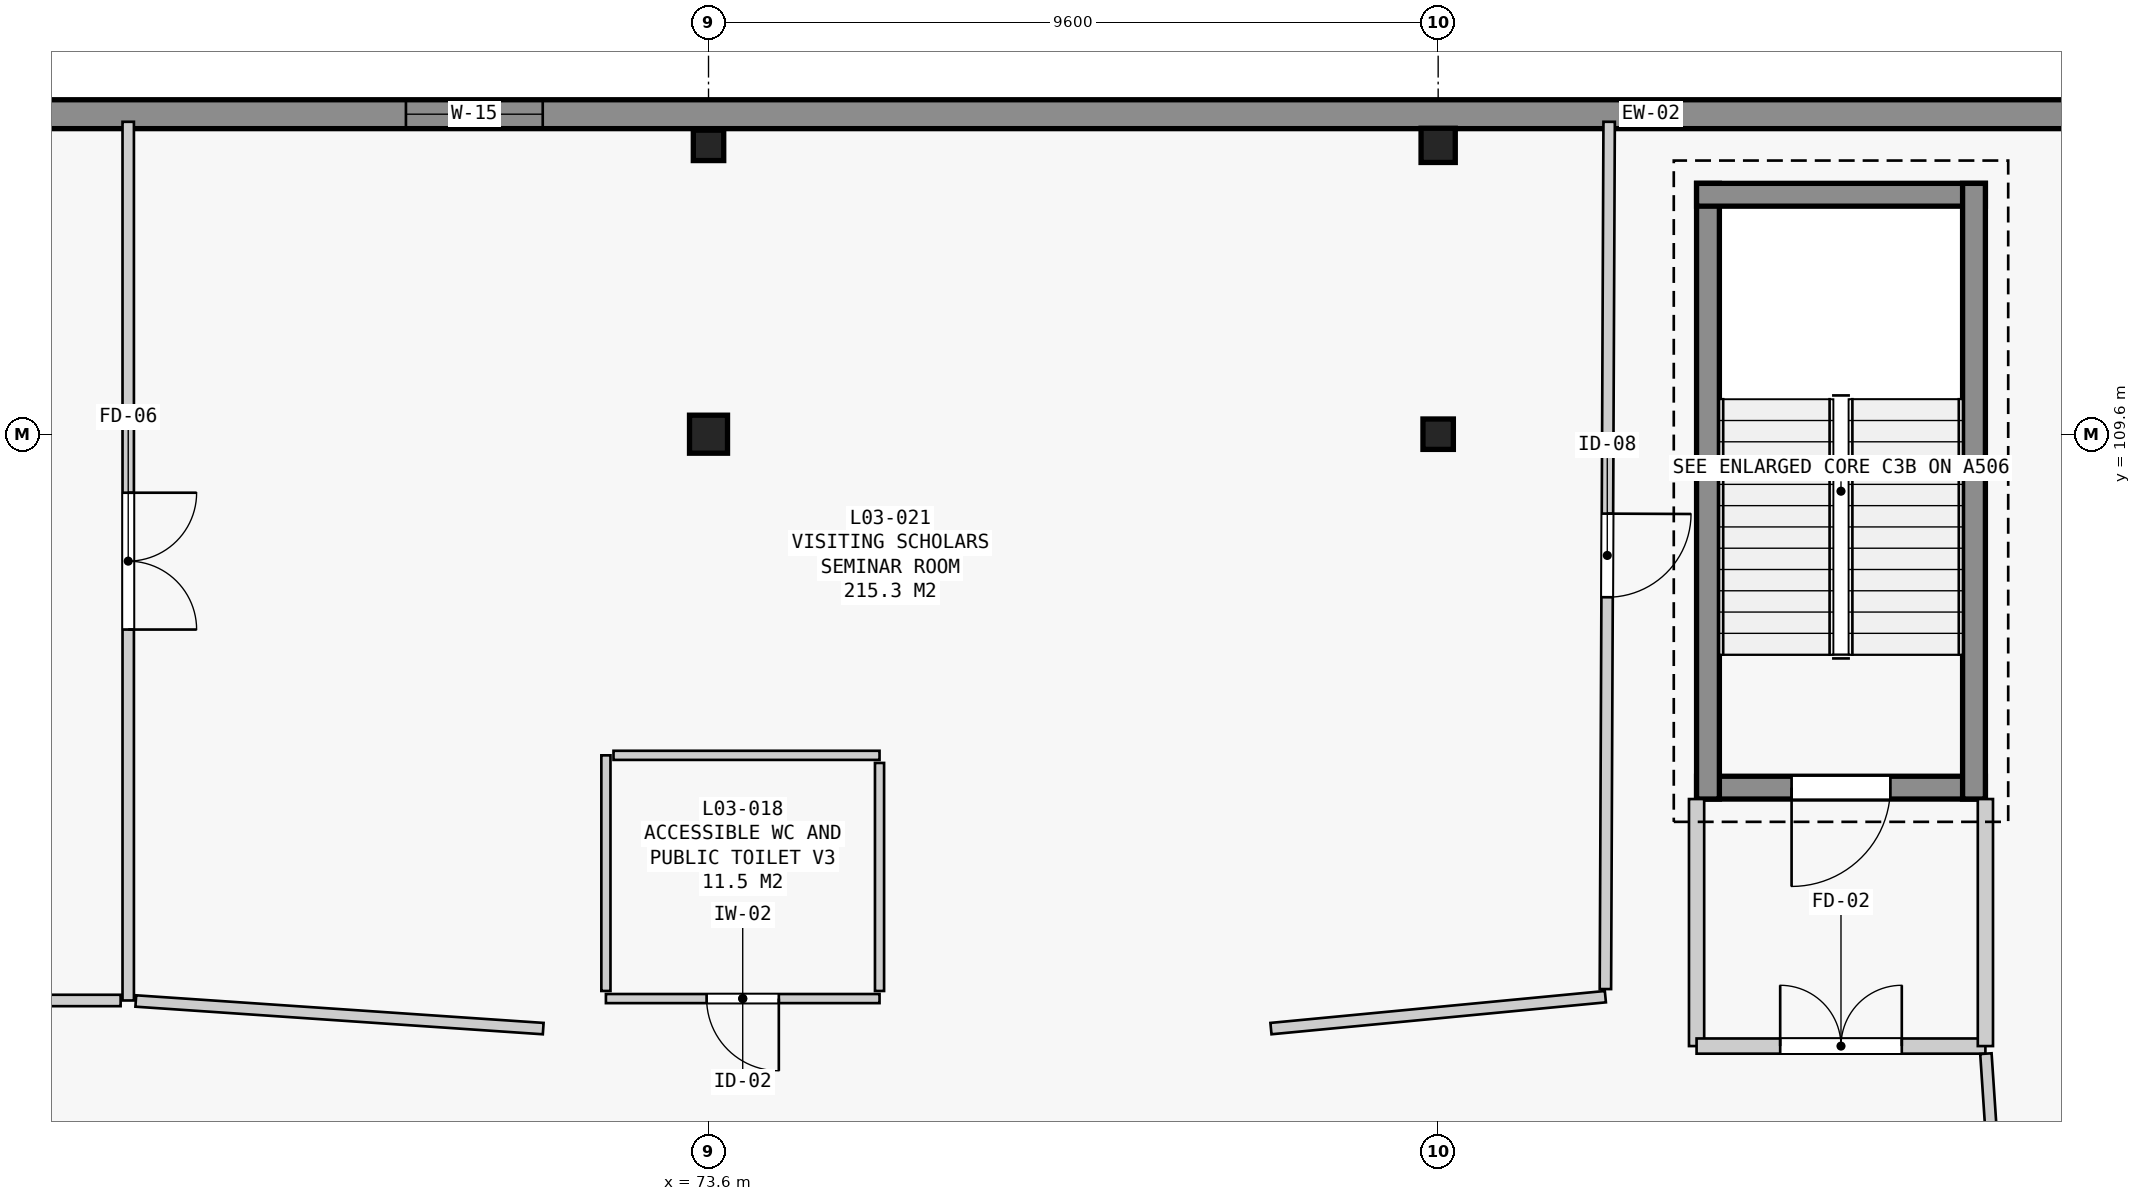
"""IFC4 building model, lengths in metres.
Left out: names, types, materials, properties, quantities, classifications, styles, units other than length and angle.
Written with IfcOpenShell. Run it as: python <this file> out.ifc"""

import sys

from ifc_helpers import new_model, si_unit, direction, frame, frame_2d, origin, origin_2d, place, context, subcontext, project, spatial, rectangle, extrude, element, fill, save


model = new_model("IFC4")
c1 = context("Model", 3, precision=1e-05, world=origin(), true_north=direction((0.0, 1.0)))
c2 = subcontext(c1, "Body", "Model", "MODEL_VIEW")
j1 = project(units=[si_unit("LENGTHUNIT", "METRE"), si_unit("PLANEANGLEUNIT", "RADIAN")], contexts=[c1])
p1 = place(None, origin())
s1 = spatial("IfcSite", under=j1, at=p1, CompositionType="ELEMENT")
p2 = place(p1, origin())
s2 = spatial("IfcBuilding", under=s1, at=p2, CompositionType="ELEMENT")
p3 = place(p2, frame((0.0, 0.0, 13.8)))
s3 = spatial("IfcBuildingStorey", under=s2, at=p3, CompositionType="ELEMENT", Elevation=13.8)
p4 = place(p3, frame((73.6, 109.6, 0.0), z_axis=(0.0, 0.0, 1.0), x_axis=(1.0, 0.0, 0.0)))
e1 = element("IfcColumn", 1, at=p4, inside=s3, PredefinedType="COLUMN", context=c2, shape_type="SweptSolid", body=[
    extrude(rectangle(XDim=0.5, YDim=0.5, at=origin_2d()), origin(), (0.0, 0.0, 1.0), 4.5),
])
for number, where, z_axis, x_axis in (
    (2, (73.6, 113.4, 0.0), (0.0, 0.0, 1.0), (1.0, 0.0, 0.0)),
    (3, (83.2, 109.6, 0.0), (0.0, 0.0, 1.0), (1.0, 0.0, 0.0)),
):
    element("IfcColumn", number, at=place(p3, frame(where, z_axis=z_axis, x_axis=x_axis)), inside=s3, PredefinedType="COLUMN", context=c2, shape_type="SweptSolid", body=[
        extrude(rectangle(XDim=0.4, YDim=0.4, at=origin_2d()), origin(), (0.0, 0.0, 1.0), 4.5),
    ])
p5 = place(p3, frame((83.2, 113.4, 0.0), z_axis=(0.0, 0.0, 1.0), x_axis=(1.0, 0.0, 0.0)))
e4 = element("IfcColumn", 4, at=p5, inside=s3, PredefinedType="COLUMN", context=c2, shape_type="SweptSolid", body=[
    extrude(rectangle(XDim=0.45, YDim=0.45, at=origin_2d()), origin(), (0.0, 0.0, 1.0), 4.5),
])
p6 = place(p3, frame((46.29, 113.81, 0.0), z_axis=(0.0, 0.0, 1.0), x_axis=(1.0, 0.0, 0.0)))
e5 = element("IfcWall", 5, at=p6, inside=s3, PredefinedType="STANDARD", context=c2, shape_type="SweptSolid", body=[
    extrude(rectangle(XDim=78.32, YDim=0.38, at=frame_2d((39.16, 0.0))), origin(), (0.0, 0.0, 1.0), 4.22),
])
p7 = place(p6, frame((23.329, 0.0, 1.05)))
e6 = element("IfcOpeningElement", 6, at=p7, cuts=e5, PredefinedType="OPENING", context=c2, shape_type="SweptSolid", body=[
    extrude(rectangle(XDim=1.8, YDim=2.5, at=frame_2d((0.9, 1.25))), frame((0.0, 0.2, 0.0), z_axis=(0.0, -1.0, 0.0), x_axis=(1.0, 0.0, 0.0)), (0.0, 0.0, 1.0), 0.4),
])
p8 = place(p6, frame((50.491, 0.0, 1.65)))
e7 = element("IfcOpeningElement", 7, at=p8, cuts=e5, PredefinedType="OPENING", context=c2, shape_type="SweptSolid", body=[
    extrude(rectangle(XDim=2.4, YDim=1.8, at=frame_2d((1.2, 0.9))), frame((0.0, 0.2, 0.0), z_axis=(0.0, -1.0, 0.0), x_axis=(1.0, 0.0, 0.0)), (0.0, 0.0, 1.0), 0.4),
])
p9 = place(p3, frame((90.4, 104.95, 0.0), z_axis=(0.0, 0.0, 1.0), x_axis=(-1.0, 0.0, 0.0)))
e8 = element("IfcWall", 8, at=p9, inside=s3, PredefinedType="SHEAR", context=c2, shape_type="SweptSolid", body=[
    extrude(rectangle(XDim=3.8, YDim=0.3, at=frame_2d((1.9, 0.0))), origin(), (0.0, 0.0, 1.0), 4.22),
])
p10 = place(p9, frame((1.25, 0.0, 0.0)))
e9 = element("IfcOpeningElement", 9, at=p10, cuts=e8, PredefinedType="OPENING", context=c2, shape_type="SweptSolid", body=[
    extrude(rectangle(XDim=1.3, YDim=2.2, at=frame_2d((0.65, 1.1))), frame((0.0, 0.16, 0.0), z_axis=(0.0, -1.0, 0.0), x_axis=(1.0, 0.0, 0.0)), (0.0, 0.0, 1.0), 0.32),
])
p11 = place(p3, frame((86.75, 104.8, 0.0), z_axis=(0.0, 0.0, 1.0), x_axis=(0.0, 1.0, 0.0)))
e10 = element("IfcWall", 10, at=p11, inside=s3, PredefinedType="SHEAR", context=c2, shape_type="SweptSolid", body=[
    extrude(rectangle(XDim=8.1, YDim=0.3, at=frame_2d((4.05, 0.0))), origin(), (0.0, 0.0, 1.0), 4.22),
])
p12 = place(p3, frame((86.6, 112.75, 0.0), z_axis=(0.0, 0.0, 1.0), x_axis=(1.0, 0.0, 0.0)))
e11 = element("IfcWall", 11, at=p12, inside=s3, PredefinedType="SHEAR", context=c2, shape_type="SweptSolid", body=[
    extrude(rectangle(XDim=3.8, YDim=0.3, at=frame_2d((1.9, 0.0))), origin(), (0.0, 0.0, 1.0), 4.22),
])
p13 = place(p3, frame((90.25, 112.9, 0.0), z_axis=(0.0, 0.0, 1.0), x_axis=(0.0, -1.0, 0.0)))
e12 = element("IfcWall", 12, at=p13, inside=s3, PredefinedType="SHEAR", context=c2, shape_type="SweptSolid", body=[
    extrude(rectangle(XDim=8.1, YDim=0.3, at=frame_2d((4.05, 0.0))), origin(), (0.0, 0.0, 1.0), 4.22),
])
p14 = place(p3, frame((86.6, 104.8, 0.0), z_axis=(0.0, 0.0, 1.0), x_axis=(0.0, -1.0, 0.0)))
e13 = element("IfcWall", 13, at=p14, inside=s3, PredefinedType="STANDARD", context=c2, shape_type="SweptSolid", body=[
    extrude(rectangle(XDim=3.25, YDim=0.2, at=frame_2d((1.625, 0.0))), origin(), (0.0, 0.0, 1.0), 4.22),
])
p15 = place(p3, frame((86.6, 101.55, 0.0), z_axis=(0.0, 0.0, 1.0), x_axis=(1.0, 0.0, 0.0)))
e14 = element("IfcWall", 14, at=p15, inside=s3, PredefinedType="STANDARD", context=c2, shape_type="SweptSolid", body=[
    extrude(rectangle(XDim=3.8, YDim=0.2, at=frame_2d((1.9, 0.0))), origin(), (0.0, 0.0, 1.0), 4.22),
])
p16 = place(p15, frame((1.1, 0.0, 0.0)))
e15 = element("IfcOpeningElement", 15, at=p16, cuts=e14, PredefinedType="OPENING", context=c2, shape_type="SweptSolid", body=[
    extrude(rectangle(XDim=1.6, YDim=2.2, at=frame_2d((0.8, 1.1))), frame((0.0, 0.11, 0.0), z_axis=(0.0, -1.0, 0.0), x_axis=(1.0, 0.0, 0.0)), (0.0, 0.0, 1.0), 0.22),
])
p17 = place(p3, frame((90.4, 101.55, 0.0), z_axis=(0.0, 0.0, 1.0), x_axis=(0.0, 1.0, 0.0)))
e16 = element("IfcWall", 16, at=p17, inside=s3, PredefinedType="STANDARD", context=c2, shape_type="SweptSolid", body=[
    extrude(rectangle(XDim=3.25, YDim=0.2, at=frame_2d((1.625, 0.0))), origin(), (0.0, 0.0, 1.0), 4.22),
])
p18 = place(p3, frame((75.85, 102.175, 0.0), z_axis=(0.0, 0.0, 1.0), x_axis=(-1.0, 0.0, 0.0)))
e17 = element("IfcWall", 17, at=p18, inside=s3, PredefinedType="PARTITIONING", context=c2, shape_type="SweptSolid", body=[
    extrude(rectangle(XDim=3.6, YDim=0.12, at=frame_2d((1.8, 0.0))), origin(), (0.0, 0.0, 1.0), 3.55),
])
p19 = place(p18, frame((1.325, 0.0, 0.0)))
e18 = element("IfcOpeningElement", 18, at=p19, cuts=e17, PredefinedType="OPENING", context=c2, shape_type="SweptSolid", body=[
    extrude(rectangle(XDim=0.95, YDim=2.15, at=frame_2d((0.475, 1.075))), frame((0.0, 0.07, 0.0), z_axis=(0.0, -1.0, 0.0), x_axis=(1.0, 0.0, 0.0)), (0.0, 0.0, 1.0), 0.14),
])
p20 = place(p3, frame((72.25, 102.275, 0.0), z_axis=(0.0, 0.0, 1.0), x_axis=(0.0, 1.0, 0.0)))
e19 = element("IfcWall", 19, at=p20, inside=s3, PredefinedType="PARTITIONING", context=c2, shape_type="SweptSolid", body=[
    extrude(rectangle(XDim=3.1, YDim=0.12, at=frame_2d((1.55, 0.0))), origin(), (0.0, 0.0, 1.0), 4.22),
])
p21 = place(p3, frame((72.35, 105.375, 0.0), z_axis=(0.0, 0.0, 1.0), x_axis=(1.0, 0.0, 0.0)))
e20 = element("IfcWall", 20, at=p21, inside=s3, PredefinedType="PARTITIONING", context=c2, shape_type="SweptSolid", body=[
    extrude(rectangle(XDim=3.5, YDim=0.12, at=frame_2d((1.75, 0.0))), origin(), (0.0, 0.0, 1.0), 3.55),
])
p22 = place(p3, frame((75.85, 105.275, 0.0), z_axis=(0.0, 0.0, 1.0), x_axis=(0.0, -1.0, 0.0)))
e21 = element("IfcWall", 21, at=p22, inside=s3, PredefinedType="PARTITIONING", context=c2, shape_type="SweptSolid", body=[
    extrude(rectangle(XDim=3.0, YDim=0.12, at=frame_2d((1.5, 0.0))), origin(), (0.0, 0.0, 1.0), 4.22),
])
p23 = place(p3, frame((65.965, 113.71, 0.0), z_axis=(0.0, 0.0, 1.0), x_axis=(0.0, -1.0, 0.0)))
e22 = element("IfcWall", 22, at=p23, inside=s3, PredefinedType="PARTITIONING", context=c2, shape_type="SweptSolid", body=[
    extrude(rectangle(XDim=11.56, YDim=0.15, at=frame_2d((5.78, 0.0))), origin(), (0.0, 0.0, 1.0), 2.715),
])
p24 = place(p23, frame((4.88, 0.0, 0.0)))
e23 = element("IfcOpeningElement", 23, at=p24, cuts=e22, PredefinedType="OPENING", context=c2, shape_type="SweptSolid", body=[
    extrude(rectangle(XDim=1.8, YDim=2.2, at=frame_2d((0.9, 1.1))), frame((0.0, 0.085, 0.0), z_axis=(0.0, -1.0, 0.0), x_axis=(1.0, 0.0, 0.0)), (0.0, 0.0, 1.0), 0.17),
])
p25 = place(p3, frame((65.865, 102.15, 0.0), z_axis=(0.0, 0.0, 1.0), x_axis=(-1.0, 0.0, 0.0)))
e24 = element("IfcWall", 24, at=p25, inside=s3, PredefinedType="PARTITIONING", context=c2, shape_type="SweptSolid", body=[
    extrude(rectangle(XDim=4.365, YDim=0.15, at=frame_2d((2.183, 0.0))), origin(), (0.0, 0.0, 1.0), 3.55),
])
p26 = place(p3, frame((85.4, 102.2, 0.0), z_axis=(0.0, 0.0, 1.0), x_axis=(-0.9954765855, -0.095007198261, 0.0)))
e25 = element("IfcWall", 25, at=p26, inside=s3, PredefinedType="PARTITIONING", context=c2, shape_type="SweptSolid", body=[
    extrude(rectangle(XDim=4.42, YDim=0.15, at=frame_2d((2.21, 0.0))), origin(), (0.0, 0.0, 1.0), 3.55),
])
p27 = place(p3, frame((71.425, 101.78, 0.0), z_axis=(0.0, 0.0, 1.0), x_axis=(-0.997711365099, 0.067616802299, 0.0)))
e26 = element("IfcWall", 26, at=p27, inside=s3, PredefinedType="PARTITIONING", context=c2, shape_type="SweptSolid", body=[
    extrude(rectangle(XDim=5.373, YDim=0.15, at=frame_2d((2.686, 0.0))), origin(), (0.0, 0.0, 1.0), 3.75),
])
p28 = place(p3, frame((85.45, 113.71, 0.0), z_axis=(0.0, 0.0, 1.0), x_axis=(-0.004322202058, -0.999990659241, 0.0)))
e27 = element("IfcWall", 27, at=p28, inside=s3, PredefinedType="PARTITIONING", context=c2, shape_type="SweptSolid", body=[
    extrude(rectangle(XDim=11.41, YDim=0.15, at=frame_2d((5.705, 0.0))), origin(), (0.0, 0.0, 1.0), 2.715),
])
p29 = place(p28, frame((5.155, 0.0, 0.0)))
e28 = element("IfcOpeningElement", 28, at=p29, cuts=e27, PredefinedType="OPENING", context=c2, shape_type="SweptSolid", body=[
    extrude(rectangle(XDim=1.1, YDim=2.2, at=frame_2d((0.55, 1.1))), frame((0.0, 0.085, 0.0), z_axis=(0.0, -1.0, 0.0), x_axis=(1.0, 0.0, 0.0)), (0.0, 0.0, 1.0), 0.17),
])
p30 = place(p3, frame((90.593, 98.65, 0.0), z_axis=(0.0, 0.0, 1.0), x_axis=(-0.066461272894, 0.997789005354, 0.0)))
e29 = element("IfcWall", 29, at=p30, inside=s3, PredefinedType="PARTITIONING", context=c2, shape_type="SweptSolid", body=[
    extrude(rectangle(XDim=2.806, YDim=0.15, at=frame_2d((1.403, 0.0))), origin(), (0.0, 0.0, 1.0), 3.55),
])
p31 = place(p7, origin())
e30 = element("IfcWindow", 30, at=p31, inside=s3, PartitioningType="SINGLE_PANEL", PredefinedType="WINDOW", context=c2, shape_type="SweptSolid", body=[
    extrude(rectangle(XDim=1.8, YDim=2.5, at=frame_2d((0.9, 1.25))), frame((0.0, 0.03, 0.0), z_axis=(0.0, -1.0, 0.0), x_axis=(1.0, 0.0, 0.0)), (0.0, 0.0, 1.0), 0.06),
])
fill(e6, e30)
p32 = place(p10, origin())
e31 = element("IfcDoor", 31, at=p32, inside=s3, OperationType="SINGLE_SWING_RIGHT", PredefinedType="DOOR", context=c2, shape_type="SweptSolid", body=[
    extrude(rectangle(XDim=1.3, YDim=2.2, at=frame_2d((0.65, 1.1))), frame((0.0, 0.025, 0.0), z_axis=(0.0, -1.0, 0.0), x_axis=(1.0, 0.0, 0.0)), (0.0, 0.0, 1.0), 0.05),
])
fill(e9, e31)
p33 = place(p16, origin())
e32 = element("IfcDoor", 32, at=p33, inside=s3, OperationType="DOUBLE_DOOR_SINGLE_SWING", PredefinedType="DOOR", context=c2, shape_type="SweptSolid", body=[
    extrude(rectangle(XDim=1.6, YDim=2.2, at=frame_2d((0.8, 1.1))), frame((0.0, 0.025, 0.0), z_axis=(0.0, -1.0, 0.0), x_axis=(1.0, 0.0, 0.0)), (0.0, 0.0, 1.0), 0.05),
])
fill(e15, e32)
p34 = place(p19, origin())
e33 = element("IfcDoor", 33, at=p34, inside=s3, OperationType="SINGLE_SWING_LEFT", PredefinedType="DOOR", context=c2, shape_type="SweptSolid", body=[
    extrude(rectangle(XDim=0.95, YDim=2.15, at=frame_2d((0.475, 1.075))), frame((0.0, 0.025, 0.0), z_axis=(0.0, -1.0, 0.0), x_axis=(1.0, 0.0, 0.0)), (0.0, 0.0, 1.0), 0.05),
])
fill(e18, e33)
p35 = place(p24, origin())
e34 = element("IfcDoor", 34, at=p35, inside=s3, OperationType="DOUBLE_DOOR_SINGLE_SWING", PredefinedType="DOOR", context=c2, shape_type="SweptSolid", body=[
    extrude(rectangle(XDim=1.8, YDim=2.2, at=frame_2d((0.9, 1.1))), frame((0.0, 0.025, 0.0), z_axis=(0.0, -1.0, 0.0), x_axis=(1.0, 0.0, 0.0)), (0.0, 0.0, 1.0), 0.05),
])
fill(e23, e34)
p36 = place(p29, origin())
e35 = element("IfcDoor", 35, at=p36, inside=s3, OperationType="SINGLE_SWING_LEFT", PredefinedType="DOOR", context=c2, shape_type="SweptSolid", body=[
    extrude(rectangle(XDim=1.1, YDim=2.2, at=frame_2d((0.55, 1.1))), frame((0.0, 0.025, 0.0), z_axis=(0.0, -1.0, 0.0), x_axis=(1.0, 0.0, 0.0)), (0.0, 0.0, 1.0), 0.05),
])
fill(e28, e35)
save(model, sys.argv[1])
